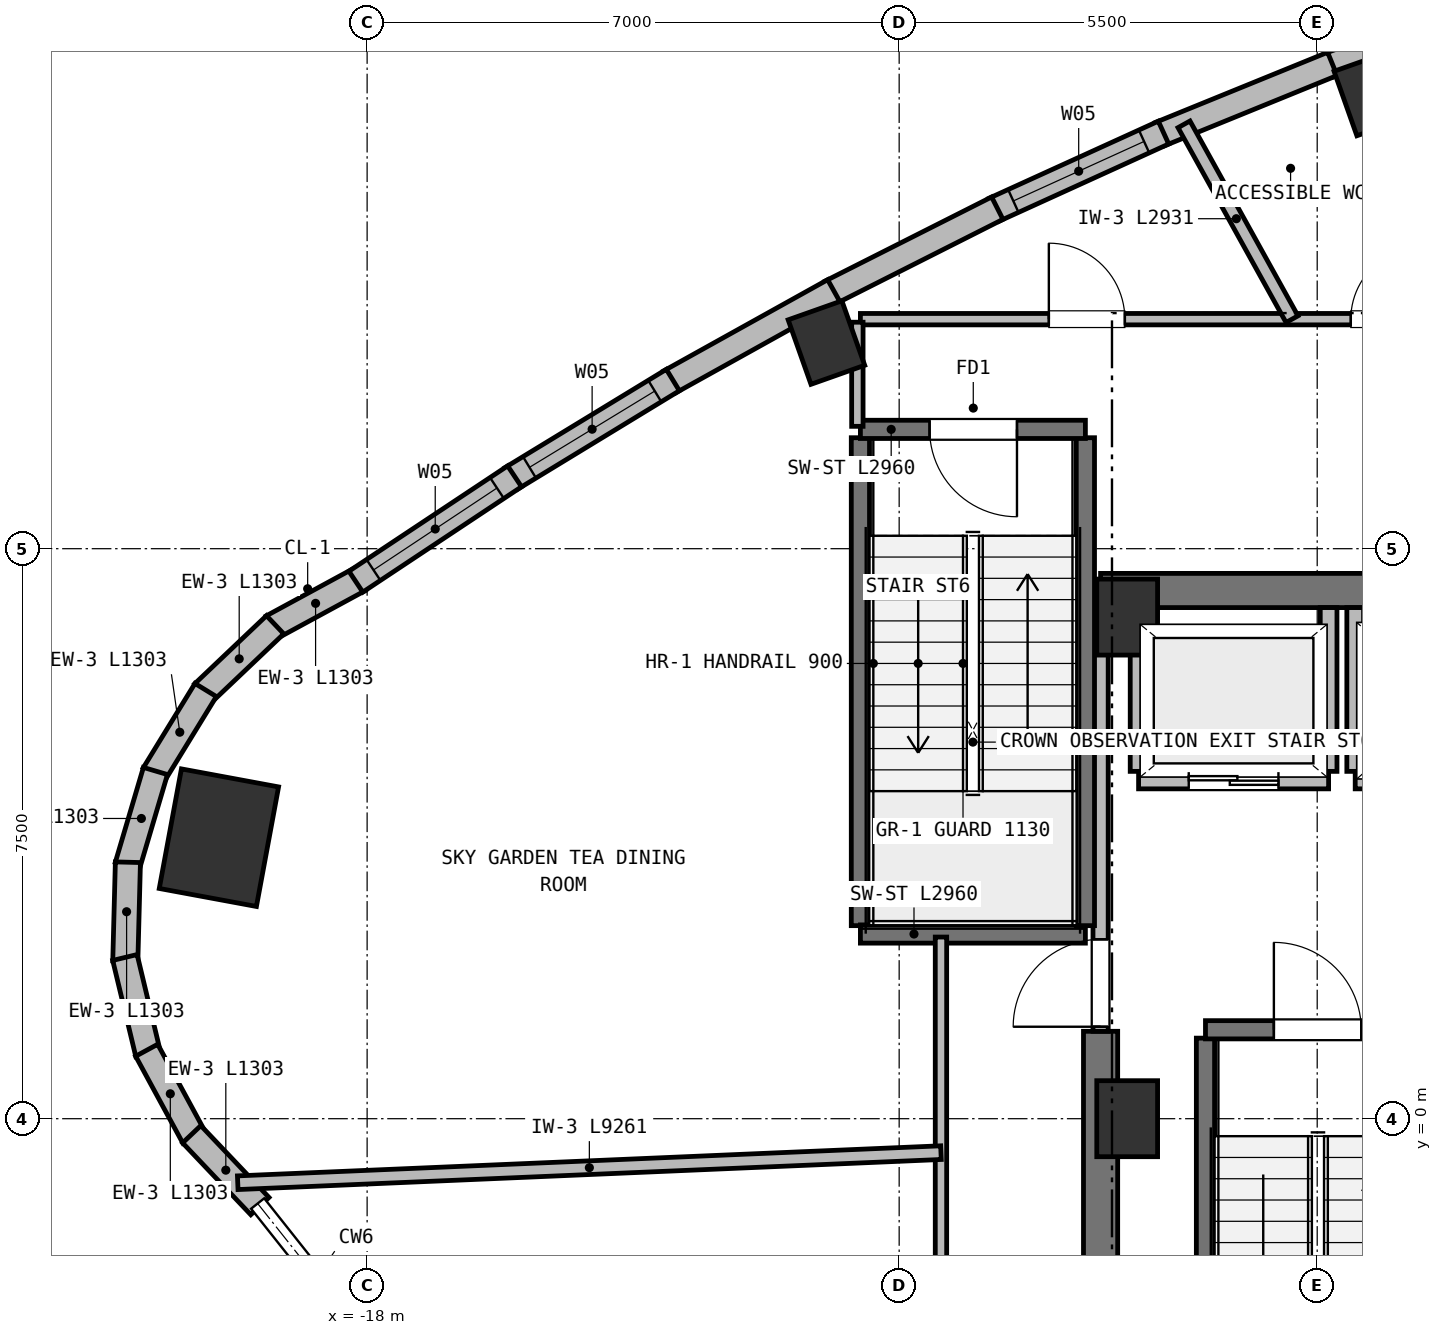
"""IFC4 building model, lengths in metres.
Left out: names, types, materials, properties, quantities, classifications, styles, units other than length and angle.
Written with IfcOpenShell. Run it as: python <this file> out.ifc"""

import sys

from ifc_helpers import new_model, si_unit, direction, frame, frame_2d, origin, origin_2d, place, context, subcontext, project, spatial, rectangle, extrude, element, fill, save


model = new_model("IFC4")
c1 = context("Model", 3, precision=1e-05, world=origin(), true_north=direction((0.0, 1.0)))
c2 = subcontext(c1, "Body", "Model", "MODEL_VIEW")
j1 = project(units=[si_unit("LENGTHUNIT", "METRE"), si_unit("PLANEANGLEUNIT", "RADIAN")], contexts=[c1])
p1 = place(None, origin())
s1 = spatial("IfcSite", under=j1, at=p1, CompositionType="ELEMENT")
p2 = place(p1, origin())
s2 = spatial("IfcBuilding", under=s1, at=p2, CompositionType="ELEMENT")
p3 = place(p2, frame((0.0, 0.0, 281.6)))
s3 = spatial("IfcBuildingStorey", under=s2, at=p3, CompositionType="ELEMENT", Elevation=281.6)
for number, where, z_axis, x_axis in (
    (1, (-8.0, 6.6, 0.0), (0.0, 0.0, 1.0), (1.0, 0.0, 0.0)),
    (2, (-8.0, 0.0, 0.0), (0.0, 0.0, 1.0), (1.0, 0.0, 0.0)),
):
    element("IfcColumn", number, at=place(p3, frame(where, z_axis=z_axis, x_axis=x_axis)), inside=s3, PredefinedType="COLUMN", context=c2, shape_type="SweptSolid", body=[
        extrude(rectangle(XDim=0.8, YDim=1.0, at=origin_2d()), origin(), (0.0, 0.0, 1.0), 4.4),
    ])
p4 = place(p3, frame((-8.35, 6.95, 0.0), z_axis=(0.0, 0.0, 1.0), x_axis=(1.0, 0.0, 0.0)))
e3 = element("IfcWall", 3, at=p4, inside=s3, PredefinedType="SHEAR", context=c2, shape_type="SweptSolid", body=[
    extrude(rectangle(XDim=16.7, YDim=0.45, at=frame_2d((8.35, 0.0))), origin(), (0.0, 0.0, 1.0), 4.13),
])
p5 = place(p3, frame((-8.35, -6.95, 0.0), z_axis=(0.0, 0.0, 1.0), x_axis=(0.0, 1.0, 0.0)))
e4 = element("IfcWall", 4, at=p5, inside=s3, PredefinedType="SHEAR", context=c2, shape_type="SweptSolid", body=[
    extrude(rectangle(XDim=8.1, YDim=0.45, at=frame_2d((4.05, 0.0))), origin(), (0.0, 0.0, 1.0), 4.13),
])
p6 = place(p3, frame((-19.95, 3.698, 0.0), z_axis=(0.0, 0.0, 1.0), x_axis=(-0.983254907564, 0.182235525492, 0.0)))
e5 = element("IfcColumn", 5, at=p6, inside=s3, PredefinedType="COLUMN", context=c2, shape_type="SweptSolid", body=[
    extrude(rectangle(XDim=1.3, YDim=1.6, at=origin_2d()), origin(), (0.0, 0.0, 1.0), 4.4),
])
for number, where, z_axis, x_axis in (
    (6, (-4.774, 13.483, 0.0), (0.0, 0.0, 1.0), (0.943, 0.334, 0.0)),
    (7, (-11.957, 10.212, 0.0), (0.0, 0.0, 1.0), (0.943, 0.334, 0.0)),
):
    element("IfcColumn", number, at=place(p3, frame(where, z_axis=z_axis, x_axis=x_axis)), inside=s3, PredefinedType="COLUMN", context=c2, shape_type="SweptSolid", body=[
        extrude(rectangle(XDim=0.75, YDim=0.9, at=origin_2d()), origin(), (0.0, 0.0, 1.0), 4.4),
    ])
p7 = place(p3, frame((-19.25, 6.47, 0.0), z_axis=(0.0, 0.0, 1.0), x_axis=(0.878774855812, 0.477236579478, 0.0)))
e8 = element("IfcWall", 8, at=p7, inside=s3, PredefinedType="SOLIDWALL", context=c2, shape_type="SweptSolid", body=[
    extrude(rectangle(XDim=1.303, YDim=0.33, at=frame_2d((0.651, 0.0))), origin(), (0.0, 0.0, 1.0), 4.13),
])
p8 = place(p3, frame((-20.156, 5.602, 0.0), z_axis=(0.0, 0.0, 1.0), x_axis=(0.725415712612, 0.688311008118, 0.0)))
e9 = element("IfcWall", 9, at=p8, inside=s3, PredefinedType="SOLIDWALL", context=c2, shape_type="SweptSolid", body=[
    extrude(rectangle(XDim=1.303, YDim=0.33, at=frame_2d((0.651, 0.0))), origin(), (0.0, 0.0, 1.0), 4.13),
])
p9 = place(p3, frame((-20.805, 4.53, 0.0), z_axis=(0.0, 0.0, 1.0), x_axis=(0.522601602676, 0.852577014047, 0.0)))
e10 = element("IfcWall", 10, at=p9, inside=s3, PredefinedType="SOLIDWALL", context=c2, shape_type="SweptSolid", body=[
    extrude(rectangle(XDim=1.303, YDim=0.33, at=frame_2d((0.651, 0.0))), origin(), (0.0, 0.0, 1.0), 4.13),
])
p10 = place(p3, frame((-21.155, 3.325, 0.0), z_axis=(0.0, 0.0, 1.0), x_axis=(0.284011785169, 0.958820789243, 0.0)))
e11 = element("IfcWall", 11, at=p10, inside=s3, PredefinedType="SOLIDWALL", context=c2, shape_type="SweptSolid", body=[
    extrude(rectangle(XDim=1.303, YDim=0.33, at=frame_2d((0.652, 0.0))), origin(), (0.0, 0.0, 1.0), 4.13),
])
for number, where, z_axis, x_axis in (
    (12, (-21.182, 2.072, 0.0), (0.0, 0.0, 1.0), (0.026, 1.0, 0.0)),
    (13, (-20.883, 0.854, 0.0), (0.0, 0.0, 1.0), (-0.233, 0.972, 0.0)),
    (14, (-20.279, -0.245, 0.0), (0.0, 0.0, 1.0), (-0.477, 0.879, 0.0)),
):
    element("IfcWall", number, at=place(p3, frame(where, z_axis=z_axis, x_axis=x_axis)), inside=s3, PredefinedType="SOLIDWALL", context=c2, shape_type="SweptSolid", body=[
        extrude(rectangle(XDim=1.303, YDim=0.33, at=frame_2d((0.651, 0.0))), origin(), (0.0, 0.0, 1.0), 4.13),
    ])
p11 = place(p3, frame((-19.411, -1.15, 0.0), z_axis=(0.0, 0.0, 1.0), x_axis=(-0.688316050819, 0.725410927809, 0.0)))
e15 = element("IfcWall", 15, at=p11, inside=s3, PredefinedType="SOLIDWALL", context=c2, shape_type="SweptSolid", body=[
    extrude(rectangle(XDim=1.303, YDim=0.33, at=frame_2d((0.652, 0.0))), origin(), (0.0, 0.0, 1.0), 4.13),
])
for number, where, z_axis, x_axis in (
    (16, (-5.347, 13.861, 0.0), (0.0, 0.0, 1.0), (0.941, 0.339, 0.0)),
    (17, (-7.568, 12.955, 0.0), (0.0, 0.0, 1.0), (0.926, 0.377, 0.0)),
):
    element("IfcWall", number, at=place(p3, frame(where, z_axis=z_axis, x_axis=x_axis)), inside=s3, PredefinedType="SOLIDWALL", context=c2, shape_type="SweptSolid", body=[
        extrude(rectangle(XDim=2.448, YDim=0.33, at=frame_2d((1.224, 0.0))), origin(), (0.0, 0.0, 1.0), 4.13),
    ])
p12 = place(p3, frame((-9.754, 11.959, 0.0), z_axis=(0.0, 0.0, 1.0), x_axis=(0.910103748432, 0.414380461763, 0.0)))
e18 = element("IfcWall", 18, at=p12, inside=s3, PredefinedType="SOLIDWALL", context=c2, shape_type="SweptSolid", body=[
    extrude(rectangle(XDim=2.452, YDim=0.33, at=frame_2d((1.226, 0.0))), origin(), (0.0, 0.0, 1.0), 4.13),
])
p13 = place(p12, frame((0.281, 0.0, 0.72)))
e19 = element("IfcOpeningElement", 19, at=p13, cuts=e18, PredefinedType="OPENING", context=c2, shape_type="SweptSolid", body=[
    extrude(rectangle(XDim=1.89, YDim=2.15, at=frame_2d((0.945, 1.075))), frame((0.0, 0.175, 0.0), z_axis=(0.0, -1.0, 0.0), x_axis=(1.0, 0.0, 0.0)), (0.0, 0.0, 1.0), 0.35),
])
p14 = place(p3, frame((-11.905, 10.872, 0.0), z_axis=(0.0, 0.0, 1.0), x_axis=(0.892653761516, 0.450743011096, 0.0)))
e20 = element("IfcWall", 20, at=p14, inside=s3, PredefinedType="SOLIDWALL", context=c2, shape_type="SweptSolid", body=[
    extrude(rectangle(XDim=2.46, YDim=0.33, at=frame_2d((1.23, 0.0))), origin(), (0.0, 0.0, 1.0), 4.13),
])
p15 = place(p3, frame((-14.021, 9.694, 0.0), z_axis=(0.0, 0.0, 1.0), x_axis=(0.873970841772, 0.485978361383, 0.0)))
e21 = element("IfcWall", 21, at=p15, inside=s3, PredefinedType="SOLIDWALL", context=c2, shape_type="SweptSolid", body=[
    extrude(rectangle(XDim=2.472, YDim=0.33, at=frame_2d((1.236, 0.0))), origin(), (0.0, 0.0, 1.0), 4.13),
])
p16 = place(p3, frame((-16.102, 8.425, 0.0), z_axis=(0.0, 0.0, 1.0), x_axis=(0.854079117913, 0.520143115253, 0.0)))
e22 = element("IfcWall", 22, at=p16, inside=s3, PredefinedType="SOLIDWALL", context=c2, shape_type="SweptSolid", body=[
    extrude(rectangle(XDim=2.487, YDim=0.33, at=frame_2d((1.244, 0.0))), origin(), (0.0, 0.0, 1.0), 4.13),
])
p17 = place(p16, frame((0.279, 0.0, 0.72)))
e23 = element("IfcOpeningElement", 23, at=p17, cuts=e22, PredefinedType="OPENING", context=c2, shape_type="SweptSolid", body=[
    extrude(rectangle(XDim=1.93, YDim=2.15, at=frame_2d((0.965, 1.075))), frame((0.0, 0.175, 0.0), z_axis=(0.0, -1.0, 0.0), x_axis=(1.0, 0.0, 0.0)), (0.0, 0.0, 1.0), 0.35),
])
p18 = place(p3, frame((-18.148, 7.066, 0.0), z_axis=(0.0, 0.0, 1.0), x_axis=(0.833157490591, 0.55303579981, 0.0)))
e24 = element("IfcWall", 24, at=p18, inside=s3, PredefinedType="SOLIDWALL", context=c2, shape_type="SweptSolid", body=[
    extrude(rectangle(XDim=2.507, YDim=0.33, at=frame_2d((1.253, 0.0))), origin(), (0.0, 0.0, 1.0), 4.13),
])
p19 = place(p18, frame((0.278, 0.0, 0.72)))
e25 = element("IfcOpeningElement", 25, at=p19, cuts=e24, PredefinedType="OPENING", context=c2, shape_type="SweptSolid", body=[
    extrude(rectangle(XDim=1.95, YDim=2.15, at=frame_2d((0.975, 1.075))), frame((0.0, 0.175, 0.0), z_axis=(0.0, -1.0, 0.0), x_axis=(1.0, 0.0, 0.0)), (0.0, 0.0, 1.0), 0.35),
])
p20 = place(p3, frame((-6.97, -6.16, 0.0), z_axis=(0.0, 0.0, 1.0), x_axis=(0.0, 1.0, 0.0)))
e26 = element("IfcWall", 26, at=p20, inside=s3, PredefinedType="SHEAR", context=c2, shape_type="SweptSolid", body=[
    extrude(rectangle(XDim=7.22, YDim=0.24, at=frame_2d((3.61, 0.0))), origin(), (0.0, 0.0, 1.0), 4.13),
])
p21 = place(p3, frame((-6.97, 1.17, 0.0), z_axis=(0.0, 0.0, 1.0), x_axis=(1.0, 0.0, 0.0)))
e27 = element("IfcWall", 27, at=p21, inside=s3, PredefinedType="SHEAR", context=c2, shape_type="SweptSolid", body=[
    extrude(rectangle(XDim=2.96, YDim=0.24, at=frame_2d((1.48, 0.0))), origin(), (0.0, 0.0, 1.0), 4.13),
])
p22 = place(p21, frame((0.9, 0.0, 0.0)))
e28 = element("IfcOpeningElement", 28, at=p22, cuts=e27, PredefinedType="OPENING", context=c2, shape_type="SweptSolid", body=[
    extrude(rectangle(XDim=1.15, YDim=2.15, at=frame_2d((0.575, 1.075))), frame((0.0, 0.13, 0.0), z_axis=(0.0, -1.0, 0.0), x_axis=(1.0, 0.0, 0.0)), (0.0, 0.0, 1.0), 0.26),
])
p23 = place(p3, frame((-7.85, 4.45, 0.0), z_axis=(0.0, 0.0, 1.0), x_axis=(1.0, 0.0, 0.0)))
e29 = element("IfcWall", 29, at=p23, inside=s3, PredefinedType="PARTITIONING", context=c2, shape_type="SweptSolid", body=[
    extrude(rectangle(XDim=2.5, YDim=0.22, at=frame_2d((1.25, 0.0))), origin(), (0.0, 0.0, 1.0), 4.13),
])
p24 = place(p23, frame((0.66, 0.0, 0.0)))
e30 = element("IfcOpeningElement", 30, at=p24, cuts=e29, PredefinedType="OPENING", context=c2, shape_type="SweptSolid", body=[
    extrude(rectangle(XDim=1.18, YDim=2.15, at=frame_2d((0.59, 1.075))), frame((0.0, 0.12, 0.0), z_axis=(0.0, -1.0, 0.0), x_axis=(1.0, 0.0, 0.0)), (0.0, 0.0, 1.0), 0.24),
])
p25 = place(p3, frame((-7.85, 4.57, 0.0), z_axis=(0.0, 0.0, 1.0), x_axis=(0.0, 1.0, 0.0)))
e31 = element("IfcWall", 31, at=p25, inside=s3, PredefinedType="PARTITIONING", context=c2, shape_type="SweptSolid", body=[
    extrude(rectangle(XDim=2.155, YDim=0.22, at=frame_2d((1.078, 0.0))), origin(), (0.0, 0.0, 1.0), 3.81),
])
p26 = place(p3, frame((-5.35, 4.57, 0.0), z_axis=(0.0, 0.0, 1.0), x_axis=(0.0, 1.0, 0.0)))
e32 = element("IfcWall", 32, at=p26, inside=s3, PredefinedType="PARTITIONING", context=c2, shape_type="SweptSolid", body=[
    extrude(rectangle(XDim=2.155, YDim=0.22, at=frame_2d((1.078, 0.0))), origin(), (0.0, 0.0, 1.0), 4.13),
])
p27 = place(p3, frame((-5.0, 4.45, 0.0), z_axis=(0.0, 0.0, 1.0), x_axis=(1.0, 0.0, 0.0)))
e33 = element("IfcWall", 33, at=p27, inside=s3, PredefinedType="PARTITIONING", context=c2, shape_type="SweptSolid", body=[
    extrude(rectangle(XDim=2.4, YDim=0.22, at=frame_2d((1.2, 0.0))), origin(), (0.0, 0.0, 1.0), 4.13),
])
p28 = place(p27, frame((0.28, 0.0, 0.0)))
e34 = element("IfcOpeningElement", 34, at=p28, cuts=e33, PredefinedType="OPENING", context=c2, shape_type="SweptSolid", body=[
    extrude(rectangle(XDim=1.22, YDim=2.15, at=frame_2d((0.61, 1.075))), frame((0.0, 0.12, 0.0), z_axis=(0.0, -1.0, 0.0), x_axis=(1.0, 0.0, 0.0)), (0.0, 0.0, 1.0), 0.24),
])
p29 = place(p3, frame((-5.0, 4.57, 0.0), z_axis=(0.0, 0.0, 1.0), x_axis=(0.0, 1.0, 0.0)))
e35 = element("IfcWall", 35, at=p29, inside=s3, PredefinedType="PARTITIONING", context=c2, shape_type="SweptSolid", body=[
    extrude(rectangle(XDim=2.155, YDim=0.22, at=frame_2d((1.078, 0.0))), origin(), (0.0, 0.0, 1.0), 4.13),
])
p30 = place(p3, frame((-8.35, 1.15, 0.0), z_axis=(0.0, 0.0, 1.0), x_axis=(0.0, 1.0, 0.0)))
e36 = element("IfcWall", 36, at=p30, inside=s3, PredefinedType="PARTITIONING", context=c2, shape_type="SweptSolid", body=[
    extrude(rectangle(XDim=5.4, YDim=0.2, at=frame_2d((2.7, 0.0))), origin(), (0.0, 0.0, 1.0), 4.13),
])
p31 = place(p30, frame((0.06, 0.0, 0.0)))
e37 = element("IfcOpeningElement", 37, at=p31, cuts=e36, PredefinedType="OPENING", context=c2, shape_type="SweptSolid", body=[
    extrude(rectangle(XDim=1.15, YDim=2.15, at=frame_2d((0.575, 1.075))), frame((0.0, 0.11, 0.0), z_axis=(0.0, -1.0, 0.0), x_axis=(1.0, 0.0, 0.0)), (0.0, 0.0, 1.0), 0.22),
])
p32 = place(p3, frame((-11.51, 2.54, 0.0), z_axis=(0.0, 0.0, 1.0), x_axis=(0.0, 1.0, 0.0)))
e38 = element("IfcWall", 38, at=p32, inside=s3, PredefinedType="SHEAR", context=c2, shape_type="SweptSolid", body=[
    extrude(rectangle(XDim=6.42, YDim=0.24, at=frame_2d((3.21, 0.0))), origin(), (0.0, 0.0, 1.0), 4.13),
])
p33 = place(p3, frame((-11.51, 2.43, 0.0), z_axis=(0.0, 0.0, 1.0), x_axis=(1.0, 0.0, 0.0)))
e39 = element("IfcWall", 39, at=p33, inside=s3, PredefinedType="SHEAR", context=c2, shape_type="SweptSolid", body=[
    extrude(rectangle(XDim=2.96, YDim=0.24, at=frame_2d((1.48, 0.0))), origin(), (0.0, 0.0, 1.0), 4.13),
])
p34 = place(p3, frame((-8.55, 2.54, 0.0), z_axis=(0.0, 0.0, 1.0), x_axis=(0.0, 1.0, 0.0)))
e40 = element("IfcWall", 40, at=p34, inside=s3, PredefinedType="SHEAR", context=c2, shape_type="SweptSolid", body=[
    extrude(rectangle(XDim=6.42, YDim=0.24, at=frame_2d((3.21, 0.0))), origin(), (0.0, 0.0, 1.0), 4.13),
])
p35 = place(p3, frame((-8.55, 9.07, 0.0), z_axis=(0.0, 0.0, 1.0), x_axis=(-1.0, 0.0, 0.0)))
e41 = element("IfcWall", 41, at=p35, inside=s3, PredefinedType="SHEAR", context=c2, shape_type="SweptSolid", body=[
    extrude(rectangle(XDim=2.96, YDim=0.24, at=frame_2d((1.48, 0.0))), origin(), (0.0, 0.0, 1.0), 4.13),
])
p36 = place(p35, frame((0.9, 0.0, 0.0)))
e42 = element("IfcOpeningElement", 42, at=p36, cuts=e41, PredefinedType="OPENING", context=c2, shape_type="SweptSolid", body=[
    extrude(rectangle(XDim=1.15, YDim=2.15, at=frame_2d((0.575, 1.075))), frame((0.0, 0.13, 0.0), z_axis=(0.0, -1.0, 0.0), x_axis=(1.0, 0.0, 0.0)), (0.0, 0.0, 1.0), 0.26),
])
p37 = place(p3, frame((-11.51, 10.52, 0.0), z_axis=(0.0, 0.0, 1.0), x_axis=(1.0, 0.0, 0.0)))
e43 = element("IfcWall", 43, at=p37, inside=s3, PredefinedType="PARTITIONING", context=c2, shape_type="SweptSolid", body=[
    extrude(rectangle(XDim=20.09, YDim=0.15, at=frame_2d((10.045, 0.0))), origin(), (0.0, 0.0, 1.0), 4.13),
])
p38 = place(p37, frame((6.452, 0.0, 0.0)))
e44 = element("IfcOpeningElement", 44, at=p38, cuts=e43, PredefinedType="OPENING", context=c2, shape_type="SweptSolid", body=[
    extrude(rectangle(XDim=0.95, YDim=2.1, at=frame_2d((0.475, 1.05))), frame((0.0, 0.085, 0.0), z_axis=(0.0, -1.0, 0.0), x_axis=(1.0, 0.0, 0.0)), (0.0, 0.0, 1.0), 0.17),
])
p39 = place(p37, frame((8.736, 0.0, 0.0)))
e45 = element("IfcOpeningElement", 45, at=p39, cuts=e43, PredefinedType="OPENING", context=c2, shape_type="SweptSolid", body=[
    extrude(rectangle(XDim=0.95, YDim=2.1, at=frame_2d((0.475, 1.05))), frame((0.0, 0.085, 0.0), z_axis=(0.0, -1.0, 0.0), x_axis=(1.0, 0.0, 0.0)), (0.0, 0.0, 1.0), 0.17),
])
p40 = place(p37, frame((2.479, 0.0, 0.0)))
e46 = element("IfcOpeningElement", 46, at=p40, cuts=e43, PredefinedType="OPENING", context=c2, shape_type="SweptSolid", body=[
    extrude(rectangle(XDim=1.0, YDim=2.15, at=frame_2d((0.5, 1.075))), frame((0.0, 0.085, 0.0), z_axis=(0.0, -1.0, 0.0), x_axis=(1.0, 0.0, 0.0)), (0.0, 0.0, 1.0), 0.17),
])
p41 = place(p37, frame((14.61, 0.0, 0.0)))
e47 = element("IfcOpeningElement", 47, at=p41, cuts=e43, PredefinedType="OPENING", context=c2, shape_type="SweptSolid", body=[
    extrude(rectangle(XDim=1.0, YDim=2.15, at=frame_2d((0.5, 1.075))), frame((0.0, 0.085, 0.0), z_axis=(0.0, -1.0, 0.0), x_axis=(1.0, 0.0, 0.0)), (0.0, 0.0, 1.0), 0.17),
])
p42 = place(p3, frame((-11.55, 9.11, 0.0), z_axis=(0.0, 0.0, 1.0), x_axis=(0.0, 1.0, 0.0)))
e48 = element("IfcWall", 48, at=p42, inside=s3, PredefinedType="PARTITIONING", context=c2, shape_type="SweptSolid", body=[
    extrude(rectangle(XDim=1.37, YDim=0.15, at=frame_2d((0.685, 0.0))), origin(), (0.0, 0.0, 1.0), 4.13),
])
p43 = place(p3, frame((-10.45, -7.24, 0.0), z_axis=(0.0, 0.0, 1.0), x_axis=(0.0, 1.0, 0.0)))
e49 = element("IfcWall", 49, at=p43, inside=s3, PredefinedType="PARTITIONING", context=c2, shape_type="SweptSolid", body=[
    extrude(rectangle(XDim=9.63, YDim=0.15, at=frame_2d((4.815, 0.0))), origin(), (0.0, 0.0, 1.0), 4.13),
])
p44 = place(p3, frame((-5.831, 10.52, 0.0), z_axis=(0.0, 0.0, 1.0), x_axis=(-0.484857723274, 0.874593041466, 0.0)))
e50 = element("IfcWall", 50, at=p44, inside=s3, PredefinedType="PARTITIONING", context=c2, shape_type="SweptSolid", body=[
    extrude(rectangle(XDim=2.931, YDim=0.18, at=frame_2d((1.466, 0.0))), origin(), (0.0, 0.0, 1.0), 4.13),
])
p45 = place(p3, frame((-10.45, -0.447, 0.0), z_axis=(0.0, 0.0, 1.0), x_axis=(-0.999087626263, -0.042707318448, 0.0)))
e51 = element("IfcWall", 51, at=p45, inside=s3, PredefinedType="PARTITIONING", context=c2, shape_type="SweptSolid", body=[
    extrude(rectangle(XDim=9.261, YDim=0.18, at=frame_2d((4.63, 0.0))), origin(), (0.0, 0.0, 1.0), 4.13),
])
p46 = place(p13, origin())
e52 = element("IfcWindow", 52, at=p46, inside=s3, PartitioningType="SINGLE_PANEL", PredefinedType="WINDOW", context=c2, shape_type="SweptSolid", body=[
    extrude(rectangle(XDim=1.89, YDim=2.15, at=frame_2d((0.945, 1.075))), frame((0.0, 0.03, 0.0), z_axis=(0.0, -1.0, 0.0), x_axis=(1.0, 0.0, 0.0)), (0.0, 0.0, 1.0), 0.06),
])
fill(e19, e52)
p47 = place(p17, origin())
e53 = element("IfcWindow", 53, at=p47, inside=s3, PartitioningType="SINGLE_PANEL", PredefinedType="WINDOW", context=c2, shape_type="SweptSolid", body=[
    extrude(rectangle(XDim=1.93, YDim=2.15, at=frame_2d((0.965, 1.075))), frame((0.0, 0.03, 0.0), z_axis=(0.0, -1.0, 0.0), x_axis=(1.0, 0.0, 0.0)), (0.0, 0.0, 1.0), 0.06),
])
fill(e23, e53)
p48 = place(p19, origin())
e54 = element("IfcWindow", 54, at=p48, inside=s3, PartitioningType="SINGLE_PANEL", PredefinedType="WINDOW", context=c2, shape_type="SweptSolid", body=[
    extrude(rectangle(XDim=1.95, YDim=2.15, at=frame_2d((0.975, 1.075))), frame((0.0, 0.03, 0.0), z_axis=(0.0, -1.0, 0.0), x_axis=(1.0, 0.0, 0.0)), (0.0, 0.0, 1.0), 0.06),
])
fill(e25, e54)
p49 = place(p22, origin())
e55 = element("IfcDoor", 55, at=p49, inside=s3, OperationType="SINGLE_SWING_LEFT", PredefinedType="DOOR", context=c2, shape_type="SweptSolid", body=[
    extrude(rectangle(XDim=1.15, YDim=2.15, at=frame_2d((0.575, 1.075))), frame((0.0, 0.025, 0.0), z_axis=(0.0, -1.0, 0.0), x_axis=(1.0, 0.0, 0.0)), (0.0, 0.0, 1.0), 0.05),
])
fill(e28, e55)
p50 = place(p24, origin())
e56 = element("IfcDoor", 56, at=p50, inside=s3, OperationType="DOUBLE_DOOR_SLIDING", PredefinedType="DOOR", context=c2, shape_type="SweptSolid", body=[
    extrude(rectangle(XDim=1.18, YDim=2.15, at=frame_2d((0.59, 1.075))), frame((0.0, 0.025, 0.0), z_axis=(0.0, -1.0, 0.0), x_axis=(1.0, 0.0, 0.0)), (0.0, 0.0, 1.0), 0.05),
])
fill(e30, e56)
p51 = place(p31, origin())
e57 = element("IfcDoor", 57, at=p51, inside=s3, OperationType="SINGLE_SWING_LEFT", PredefinedType="DOOR", context=c2, shape_type="SweptSolid", body=[
    extrude(rectangle(XDim=1.15, YDim=2.15, at=frame_2d((0.575, 1.075))), frame((0.0, 0.025, 0.0), z_axis=(0.0, -1.0, 0.0), x_axis=(1.0, 0.0, 0.0)), (0.0, 0.0, 1.0), 0.05),
])
fill(e37, e57)
p52 = place(p36, origin())
e58 = element("IfcDoor", 58, at=p52, inside=s3, OperationType="SINGLE_SWING_LEFT", PredefinedType="DOOR", context=c2, shape_type="SweptSolid", body=[
    extrude(rectangle(XDim=1.15, YDim=2.15, at=frame_2d((0.575, 1.075))), frame((0.0, 0.025, 0.0), z_axis=(0.0, -1.0, 0.0), x_axis=(1.0, 0.0, 0.0)), (0.0, 0.0, 1.0), 0.05),
])
fill(e42, e58)
p53 = place(p38, origin())
e59 = element("IfcDoor", 59, at=p53, inside=s3, OperationType="SINGLE_SWING_RIGHT", PredefinedType="DOOR", context=c2, shape_type="SweptSolid", body=[
    extrude(rectangle(XDim=0.95, YDim=2.1, at=frame_2d((0.475, 1.05))), frame((0.0, 0.025, 0.0), z_axis=(0.0, -1.0, 0.0), x_axis=(1.0, 0.0, 0.0)), (0.0, 0.0, 1.0), 0.05),
])
fill(e44, e59)
p54 = place(p40, origin())
e60 = element("IfcDoor", 60, at=p54, inside=s3, OperationType="SINGLE_SWING_LEFT", PredefinedType="DOOR", context=c2, shape_type="SweptSolid", body=[
    extrude(rectangle(XDim=1.0, YDim=2.15, at=frame_2d((0.5, 1.075))), frame((0.0, 0.025, 0.0), z_axis=(0.0, -1.0, 0.0), x_axis=(1.0, 0.0, 0.0)), (0.0, 0.0, 1.0), 0.05),
])
fill(e46, e60)
save(model, sys.argv[1])
